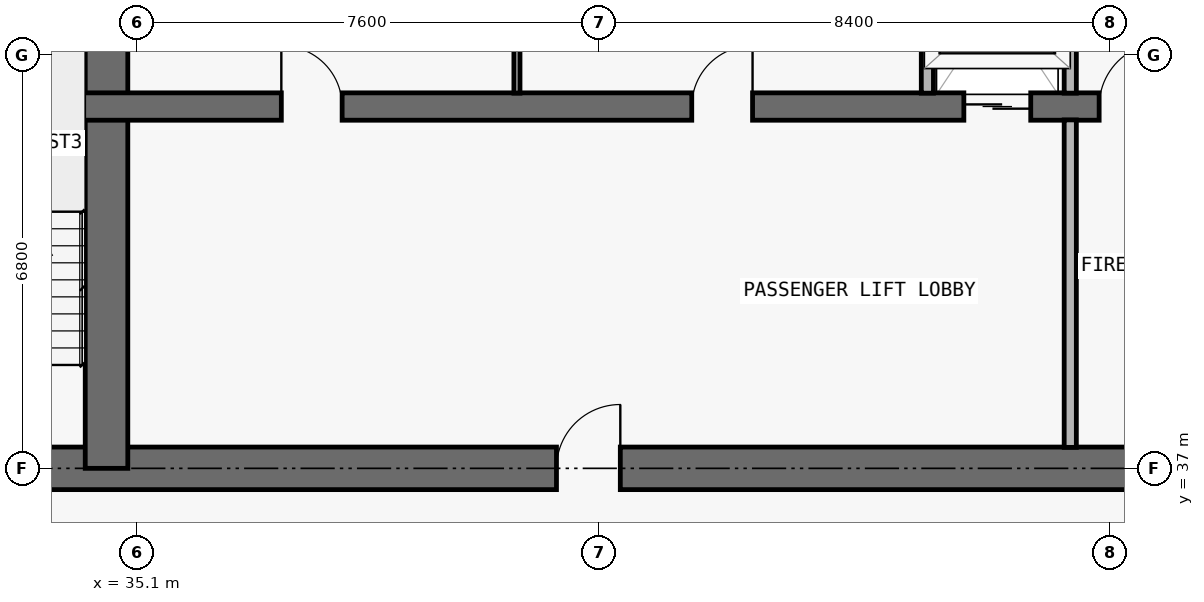
"""IFC4 building model, lengths in metres.
Left out: names, types, materials, properties, quantities, classifications, styles, units other than length and angle.
Written with IfcOpenShell. Run it as: python <this file> out.ifc"""

import sys

from ifc_helpers import new_model, si_unit, direction, frame, frame_2d, origin, place, context, subcontext, project, spatial, rectangle, extrude, element, fill, save


model = new_model("IFC4")
c1 = context("Model", 3, precision=1e-05, world=origin(), true_north=direction((0.0, 1.0)))
c2 = subcontext(c1, "Body", "Model", "MODEL_VIEW")
j1 = project(units=[si_unit("LENGTHUNIT", "METRE"), si_unit("PLANEANGLEUNIT", "RADIAN")], contexts=[c1])
p1 = place(None, origin())
s1 = spatial("IfcSite", under=j1, at=p1, CompositionType="ELEMENT")
p2 = place(p1, origin())
s2 = spatial("IfcBuilding", under=s1, at=p2, CompositionType="ELEMENT")
p3 = place(p2, frame((0.0, 0.0, 259.5)))
s3 = spatial("IfcBuildingStorey", under=s2, at=p3, CompositionType="ELEMENT", Elevation=259.5)
p4 = place(p3, frame((17.95, 37.0, 0.0), z_axis=(0.0, 0.0, 1.0), x_axis=(1.0, 0.0, 0.0)))
e1 = element("IfcWall", 1, at=p4, inside=s3, PredefinedType="SHEAR", context=c2, shape_type="SweptSolid", body=[
    extrude(rectangle(XDim=41.9, YDim=0.7, at=frame_2d((20.95, 0.0))), origin(), (0.0, 0.0, 1.0), 3.05),
])
p5 = place(p4, frame((14.35, 0.0, 0.0)))
e2 = element("IfcOpeningElement", 2, at=p5, cuts=e1, PredefinedType="OPENING", context=c2, shape_type="SweptSolid", body=[
    extrude(rectangle(XDim=1.1, YDim=2.15, at=frame_2d((0.55, 1.075))), frame((0.0, 0.36, 0.0), z_axis=(0.0, -1.0, 0.0), x_axis=(1.0, 0.0, 0.0)), (0.0, 0.0, 1.0), 0.72),
])
p6 = place(p4, frame((6.2, 0.0, 0.0)))
e3 = element("IfcOpeningElement", 3, at=p6, cuts=e1, PredefinedType="OPENING", context=c2, shape_type="SweptSolid", body=[
    extrude(rectangle(XDim=1.05, YDim=2.15, at=frame_2d((0.525, 1.075))), frame((0.0, 0.36, 0.0), z_axis=(0.0, -1.0, 0.0), x_axis=(1.0, 0.0, 0.0)), (0.0, 0.0, 1.0), 0.72),
])
p7 = place(p4, frame((34.7, 0.0, 0.0)))
e4 = element("IfcOpeningElement", 4, at=p7, cuts=e1, PredefinedType="OPENING", context=c2, shape_type="SweptSolid", body=[
    extrude(rectangle(XDim=1.05, YDim=2.15, at=frame_2d((0.525, 1.075))), frame((0.0, 0.36, 0.0), z_axis=(0.0, -1.0, 0.0), x_axis=(1.0, 0.0, 0.0)), (0.0, 0.0, 1.0), 0.72),
])
p8 = place(p4, frame((10.812, 0.0, 0.0)))
e5 = element("IfcOpeningElement", 5, at=p8, cuts=e1, PredefinedType="OPENING", context=c2, shape_type="SweptSolid", body=[
    extrude(rectangle(XDim=1.05, YDim=2.15, at=frame_2d((0.525, 1.075))), frame((0.0, 0.36, 0.0), z_axis=(0.0, -1.0, 0.0), x_axis=(1.0, 0.0, 0.0)), (0.0, 0.0, 1.0), 0.72),
])
p9 = place(p4, frame((24.05, 0.0, 0.0)))
e6 = element("IfcOpeningElement", 6, at=p9, cuts=e1, PredefinedType="OPENING", context=c2, shape_type="SweptSolid", body=[
    extrude(rectangle(XDim=1.05, YDim=2.15, at=frame_2d((0.525, 1.075))), frame((0.0, 0.36, 0.0), z_axis=(0.0, -1.0, 0.0), x_axis=(1.0, 0.0, 0.0)), (0.0, 0.0, 1.0), 0.72),
])
p10 = place(p3, frame((34.6, 37.0, 0.0), z_axis=(0.0, 0.0, 1.0), x_axis=(0.0, 1.0, 0.0)))
e7 = element("IfcWall", 7, at=p10, inside=s3, PredefinedType="SHEAR", context=c2, shape_type="SweptSolid", body=[
    extrude(rectangle(XDim=9.575, YDim=0.7, at=frame_2d((4.788, 0.0))), origin(), (0.0, 0.0, 1.0), 3.05),
])
p11 = place(p3, frame((22.25, 42.95, 0.0), z_axis=(0.0, 0.0, 1.0), x_axis=(1.0, 0.0, 0.0)))
e8 = element("IfcWall", 8, at=p11, inside=s3, PredefinedType="SHEAR", context=c2, shape_type="SweptSolid", body=[
    extrude(rectangle(XDim=33.3, YDim=0.45, at=frame_2d((16.65, 0.0))), origin(), (0.0, 0.0, 1.0), 3.05),
])
p12 = place(p11, frame((1.05, 0.0, 0.0)))
e9 = element("IfcOpeningElement", 9, at=p12, cuts=e8, PredefinedType="OPENING", context=c2, shape_type="SweptSolid", body=[
    extrude(rectangle(XDim=1.2, YDim=2.2, at=frame_2d((0.6, 1.1))), frame((0.0, 0.235, 0.0), z_axis=(0.0, -1.0, 0.0), x_axis=(1.0, 0.0, 0.0)), (0.0, 0.0, 1.0), 0.47),
])
p13 = place(p11, frame((31.05, 0.0, 0.0)))
e10 = element("IfcOpeningElement", 10, at=p13, cuts=e8, PredefinedType="OPENING", context=c2, shape_type="SweptSolid", body=[
    extrude(rectangle(XDim=1.2, YDim=2.2, at=frame_2d((0.6, 1.1))), frame((0.0, 0.235, 0.0), z_axis=(0.0, -1.0, 0.0), x_axis=(1.0, 0.0, 0.0)), (0.0, 0.0, 1.0), 0.47),
])
p14 = place(p11, frame((26.45, 0.0, 0.0)))
e11 = element("IfcOpeningElement", 11, at=p14, cuts=e8, PredefinedType="OPENING", context=c2, shape_type="SweptSolid", body=[
    extrude(rectangle(XDim=1.1, YDim=2.2, at=frame_2d((0.55, 1.1))), frame((0.0, 0.235, 0.0), z_axis=(0.0, -1.0, 0.0), x_axis=(1.0, 0.0, 0.0)), (0.0, 0.0, 1.0), 0.47),
])
p15 = place(p11, frame((5.95, 0.0, 0.0)))
e12 = element("IfcOpeningElement", 12, at=p15, cuts=e8, PredefinedType="OPENING", context=c2, shape_type="SweptSolid", body=[
    extrude(rectangle(XDim=1.1, YDim=2.2, at=frame_2d((0.55, 1.1))), frame((0.0, 0.235, 0.0), z_axis=(0.0, -1.0, 0.0), x_axis=(1.0, 0.0, 0.0)), (0.0, 0.0, 1.0), 0.47),
])
p16 = place(p11, frame((3.625, 0.0, 0.0)))
e13 = element("IfcOpeningElement", 13, at=p16, cuts=e8, PredefinedType="OPENING", context=c2, shape_type="SweptSolid", body=[
    extrude(rectangle(XDim=1.05, YDim=2.15, at=frame_2d((0.525, 1.075))), frame((0.0, 0.235, 0.0), z_axis=(0.0, -1.0, 0.0), x_axis=(1.0, 0.0, 0.0)), (0.0, 0.0, 1.0), 0.47),
])
p17 = place(p11, frame((28.675, 0.0, 0.0)))
e14 = element("IfcOpeningElement", 14, at=p17, cuts=e8, PredefinedType="OPENING", context=c2, shape_type="SweptSolid", body=[
    extrude(rectangle(XDim=1.05, YDim=2.15, at=frame_2d((0.525, 1.075))), frame((0.0, 0.235, 0.0), z_axis=(0.0, -1.0, 0.0), x_axis=(1.0, 0.0, 0.0)), (0.0, 0.0, 1.0), 0.47),
])
p18 = place(p11, frame((15.225, 0.0, 0.0)))
e15 = element("IfcOpeningElement", 15, at=p18, cuts=e8, PredefinedType="OPENING", context=c2, shape_type="SweptSolid", body=[
    extrude(rectangle(XDim=1.0, YDim=2.2, at=frame_2d((0.5, 1.1))), frame((0.0, 0.235, 0.0), z_axis=(0.0, -1.0, 0.0), x_axis=(1.0, 0.0, 0.0)), (0.0, 0.0, 1.0), 0.47),
])
p19 = place(p11, frame((21.975, 0.0, 0.0)))
e16 = element("IfcOpeningElement", 16, at=p19, cuts=e8, PredefinedType="OPENING", context=c2, shape_type="SweptSolid", body=[
    extrude(rectangle(XDim=1.0, YDim=2.2, at=frame_2d((0.5, 1.1))), frame((0.0, 0.235, 0.0), z_axis=(0.0, -1.0, 0.0), x_axis=(1.0, 0.0, 0.0)), (0.0, 0.0, 1.0), 0.47),
])
p20 = place(p3, frame((41.35, 43.17, 0.0), z_axis=(0.0, 0.0, 1.0), x_axis=(0.0, 1.0, 0.0)))
e17 = element("IfcWall", 17, at=p20, inside=s3, PredefinedType="MOVABLE", context=c2, shape_type="SweptSolid", body=[
    extrude(rectangle(XDim=3.185, YDim=0.1, at=frame_2d((1.593, 0.0))), origin(), (0.0, 0.0, 1.0), 3.05),
])
p21 = place(p3, frame((48.1, 43.17, 0.0), z_axis=(0.0, 0.0, 1.0), x_axis=(0.0, 1.0, 0.0)))
e18 = element("IfcWall", 18, at=p21, inside=s3, PredefinedType="PARTITIONING", context=c2, shape_type="SweptSolid", body=[
    extrude(rectangle(XDim=3.185, YDim=0.2, at=frame_2d((1.593, 0.0))), origin(), (0.0, 0.0, 1.0), 3.05),
])
p22 = place(p3, frame((50.45, 37.345, 0.0), z_axis=(0.0, 0.0, 1.0), x_axis=(0.0, 1.0, 0.0)))
e19 = element("IfcWall", 19, at=p22, inside=s3, PredefinedType="PARTITIONING", context=c2, shape_type="SweptSolid", body=[
    extrude(rectangle(XDim=5.385, YDim=0.2, at=frame_2d((2.692, 0.0))), origin(), (0.0, 0.0, 1.0), 3.05),
])
p23 = place(p3, frame((50.45, 43.17, 0.0), z_axis=(0.0, 0.0, 1.0), x_axis=(0.0, 1.0, 0.0)))
e20 = element("IfcWall", 20, at=p23, inside=s3, PredefinedType="PARTITIONING", context=c2, shape_type="SweptSolid", body=[
    extrude(rectangle(XDim=3.185, YDim=0.2, at=frame_2d((1.593, 0.0))), origin(), (0.0, 0.0, 1.0), 3.05),
])
p24 = place(p14, origin())
e21 = element("IfcDoor", 21, at=p24, inside=s3, OperationType="DOUBLE_DOOR_SLIDING", PredefinedType="DOOR", context=c2, shape_type="SweptSolid", body=[
    extrude(rectangle(XDim=1.1, YDim=2.2, at=frame_2d((0.55, 1.1))), frame((0.0, 0.025, 0.0), z_axis=(0.0, -1.0, 0.0), x_axis=(1.0, 0.0, 0.0)), (0.0, 0.0, 1.0), 0.05),
])
fill(e11, e21)
p25 = place(p17, origin())
e22 = element("IfcDoor", 22, at=p25, inside=s3, OperationType="SINGLE_SWING_RIGHT", PredefinedType="DOOR", context=c2, shape_type="SweptSolid", body=[
    extrude(rectangle(XDim=1.05, YDim=2.15, at=frame_2d((0.525, 1.075))), frame((0.0, 0.025, 0.0), z_axis=(0.0, -1.0, 0.0), x_axis=(1.0, 0.0, 0.0)), (0.0, 0.0, 1.0), 0.05),
])
fill(e14, e22)
p26 = place(p9, origin())
e23 = element("IfcDoor", 23, at=p26, inside=s3, OperationType="SINGLE_SWING_RIGHT", PredefinedType="DOOR", context=c2, shape_type="SweptSolid", body=[
    extrude(rectangle(XDim=1.05, YDim=2.15, at=frame_2d((0.525, 1.075))), frame((0.0, 0.025, 0.0), z_axis=(0.0, -1.0, 0.0), x_axis=(1.0, 0.0, 0.0)), (0.0, 0.0, 1.0), 0.05),
])
fill(e6, e23)
p27 = place(p18, origin())
e24 = element("IfcDoor", 24, at=p27, inside=s3, OperationType="SINGLE_SWING_LEFT", PredefinedType="DOOR", context=c2, shape_type="SweptSolid", body=[
    extrude(rectangle(XDim=1.0, YDim=2.2, at=frame_2d((0.5, 1.1))), frame((0.0, 0.025, 0.0), z_axis=(0.0, -1.0, 0.0), x_axis=(1.0, 0.0, 0.0)), (0.0, 0.0, 1.0), 0.05),
])
fill(e15, e24)
p28 = place(p19, origin())
e25 = element("IfcDoor", 25, at=p28, inside=s3, OperationType="SINGLE_SWING_RIGHT", PredefinedType="DOOR", context=c2, shape_type="SweptSolid", body=[
    extrude(rectangle(XDim=1.0, YDim=2.2, at=frame_2d((0.5, 1.1))), frame((0.0, 0.025, 0.0), z_axis=(0.0, -1.0, 0.0), x_axis=(1.0, 0.0, 0.0)), (0.0, 0.0, 1.0), 0.05),
])
fill(e16, e25)
save(model, sys.argv[1])
